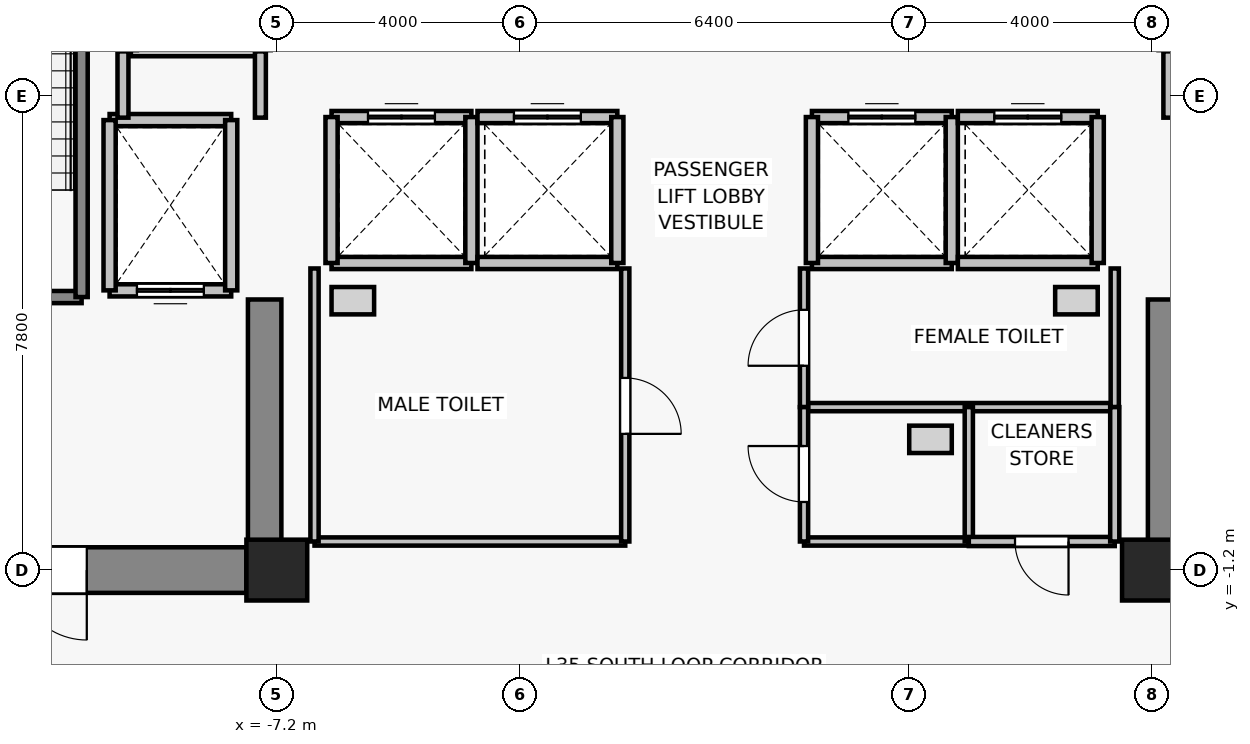
"""IFC4 building model, lengths in metres.
Left out: names, types, materials, properties, quantities, classifications, styles, units other than length and angle.
Written with IfcOpenShell. Run it as: python <this file> out.ifc"""

import sys

from ifc_helpers import new_model, si_unit, direction, frame, frame_2d, origin, origin_2d, place, context, subcontext, project, spatial, rectangle, extrude, source, transform, mapped, element, fill, save


model = new_model("IFC4")
c1 = context("Model", 3, precision=1e-05, world=origin(), true_north=direction((0.0, 1.0)))
c2 = subcontext(c1, "Body", "Model", "MODEL_VIEW")
j1 = project(units=[si_unit("LENGTHUNIT", "METRE"), si_unit("PLANEANGLEUNIT", "RADIAN")], contexts=[c1])
p1 = place(None, origin())
s1 = spatial("IfcSite", under=j1, at=p1, CompositionType="ELEMENT")
p2 = place(p1, origin())
s2 = spatial("IfcBuilding", under=s1, at=p2, CompositionType="ELEMENT")
p3 = place(p2, frame((0.0, 0.0, 126.4)))
s3 = spatial("IfcBuildingStorey", under=s2, at=p3, CompositionType="ELEMENT", Elevation=126.4)
for number, where, z_axis, x_axis in (
    (1, (-7.2, -1.2, 0.0), (0.0, 0.0, 1.0), (1.0, 0.0, 0.0)),
    (2, (7.2, -1.2, 0.0), (0.0, 0.0, 1.0), (1.0, 0.0, 0.0)),
):
    element("IfcColumn", number, at=place(p3, frame(where, z_axis=z_axis, x_axis=x_axis)), inside=s3, PredefinedType="COLUMN", context=c2, shape_type="SweptSolid", body=[
        extrude(rectangle(XDim=1.0, YDim=1.0, at=origin_2d()), origin(), (0.0, 0.0, 1.0), 3.3),
    ])
p4 = place(p3, frame((-7.7, -1.2, 0.0), z_axis=(0.0, 0.0, 1.0), x_axis=(-1.0, 0.0, 0.0)))
e3 = element("IfcWall", 3, at=p4, inside=s3, PredefinedType="SHEAR", context=c2, shape_type="SweptSolid", body=[
    extrude(rectangle(XDim=6.2, YDim=0.75, at=frame_2d((3.1, 0.0))), origin(), (0.0, 0.0, 1.0), 3.075),
])
p5 = place(p4, frame((2.625, 0.0, 0.0)))
e4 = element("IfcOpeningElement", 4, at=p5, cuts=e3, PredefinedType="OPENING", context=c2, shape_type="SweptSolid", body=[
    extrude(rectangle(XDim=1.15, YDim=2.15, at=frame_2d((0.575, 1.075))), frame((0.0, 0.385, 0.0), z_axis=(0.0, -1.0, 0.0), x_axis=(1.0, 0.0, 0.0)), (0.0, 0.0, 1.0), 0.77),
])
for number, where, z_axis, x_axis in (
    (5, (-7.4, -0.825, 0.0), (0.0, 0.0, 1.0), (0.0, 1.0, 0.0)),
    (6, (7.4, -0.825, 0.0), (0.0, 0.0, 1.0), (0.0, 1.0, 0.0)),
):
    element("IfcWall", number, at=place(p3, frame(where, z_axis=z_axis, x_axis=x_axis)), inside=s3, PredefinedType="SHEAR", context=c2, shape_type="SweptSolid", body=[
        extrude(rectangle(XDim=4.075, YDim=0.55, at=frame_2d((2.038, 0.0))), origin(), (0.0, 0.0, 1.0), 3.075),
    ])
p6 = place(p3, frame((-7.95, 3.4, 0.0), z_axis=(0.0, 0.0, 1.0), x_axis=(-1.0, 0.0, 0.0)))
e7 = element("IfcWall", 7, at=p6, inside=s3, PredefinedType="SOLIDWALL", context=c2, shape_type="SweptSolid", body=[
    extrude(rectangle(XDim=2.0, YDim=0.2, at=frame_2d((1.0, 0.0))), origin(), (0.0, 0.0, 1.0), 3.075),
])
p7 = place(p6, frame((0.45, 0.0, 0.0)))
e8 = element("IfcOpeningElement", 8, at=p7, cuts=e7, PredefinedType="OPENING", context=c2, shape_type="SweptSolid", body=[
    extrude(rectangle(XDim=1.1, YDim=2.2, at=frame_2d((0.55, 1.1))), frame((0.0, 0.11, 0.0), z_axis=(0.0, -1.0, 0.0), x_axis=(1.0, 0.0, 0.0)), (0.0, 0.0, 1.0), 0.22),
])
p8 = place(p3, frame((-9.95, 6.2, 0.0), z_axis=(0.0, 0.0, 1.0), x_axis=(1.0, 0.0, 0.0)))
e9 = element("IfcWall", 9, at=p8, inside=s3, PredefinedType="SOLIDWALL", context=c2, shape_type="SweptSolid", body=[
    extrude(rectangle(XDim=2.0, YDim=0.2, at=frame_2d((1.0, 0.0))), origin(), (0.0, 0.0, 1.0), 3.075),
])
for number, where, z_axis, x_axis in (
    (10, (-9.95, 3.4, 0.0), (0.0, 0.0, 1.0), (0.0, 1.0, 0.0)),
    (11, (-7.95, 6.2, 0.0), (0.0, 0.0, 1.0), (0.0, -1.0, 0.0)),
):
    element("IfcWall", number, at=place(p3, frame(where, z_axis=z_axis, x_axis=x_axis)), inside=s3, PredefinedType="SOLIDWALL", context=c2, shape_type="SweptSolid", body=[
        extrude(rectangle(XDim=2.8, YDim=0.2, at=frame_2d((1.4, 0.0))), origin(), (0.0, 0.0, 1.0), 3.075),
    ])
p9 = place(p3, frame((-4.0, 3.85, 0.0), z_axis=(0.0, 0.0, 1.0), x_axis=(-1.0, 0.0, 0.0)))
e12 = element("IfcWall", 12, at=p9, inside=s3, PredefinedType="SOLIDWALL", context=c2, shape_type="SweptSolid", body=[
    extrude(rectangle(XDim=2.3, YDim=0.2, at=frame_2d((1.15, 0.0))), origin(), (0.0, 0.0, 1.0), 3.075),
])
p10 = place(p3, frame((-6.3, 6.25, 0.0), z_axis=(0.0, 0.0, 1.0), x_axis=(1.0, 0.0, 0.0)))
e13 = element("IfcWall", 13, at=p10, inside=s3, PredefinedType="SOLIDWALL", context=c2, shape_type="SweptSolid", body=[
    extrude(rectangle(XDim=2.3, YDim=0.2, at=frame_2d((1.15, 0.0))), origin(), (0.0, 0.0, 1.0), 3.075),
])
p11 = place(p10, frame((0.6, 0.0, 0.0)))
e14 = element("IfcOpeningElement", 14, at=p11, cuts=e13, PredefinedType="OPENING", context=c2, shape_type="SweptSolid", body=[
    extrude(rectangle(XDim=1.1, YDim=2.2, at=frame_2d((0.55, 1.1))), frame((0.0, 0.11, 0.0), z_axis=(0.0, -1.0, 0.0), x_axis=(1.0, 0.0, 0.0)), (0.0, 0.0, 1.0), 0.22),
])
for number, where, z_axis, x_axis in (
    (15, (-6.3, 3.85, 0.0), (0.0, 0.0, 1.0), (0.0, 1.0, 0.0)),
    (16, (-4.0, 6.25, 0.0), (0.0, 0.0, 1.0), (0.0, -1.0, 0.0)),
):
    element("IfcWall", number, at=place(p3, frame(where, z_axis=z_axis, x_axis=x_axis)), inside=s3, PredefinedType="SOLIDWALL", context=c2, shape_type="SweptSolid", body=[
        extrude(rectangle(XDim=2.4, YDim=0.2, at=frame_2d((1.2, 0.0))), origin(), (0.0, 0.0, 1.0), 3.075),
    ])
p12 = place(p3, frame((-1.6, 3.85, 0.0), z_axis=(0.0, 0.0, 1.0), x_axis=(-1.0, 0.0, 0.0)))
e17 = element("IfcWall", 17, at=p12, inside=s3, PredefinedType="SOLIDWALL", context=c2, shape_type="SweptSolid", body=[
    extrude(rectangle(XDim=2.3, YDim=0.2, at=frame_2d((1.15, 0.0))), origin(), (0.0, 0.0, 1.0), 3.075),
])
p13 = place(p3, frame((-3.9, 6.25, 0.0), z_axis=(0.0, 0.0, 1.0), x_axis=(1.0, 0.0, 0.0)))
e18 = element("IfcWall", 18, at=p13, inside=s3, PredefinedType="SOLIDWALL", context=c2, shape_type="SweptSolid", body=[
    extrude(rectangle(XDim=2.3, YDim=0.2, at=frame_2d((1.15, 0.0))), origin(), (0.0, 0.0, 1.0), 3.075),
])
p14 = place(p13, frame((0.6, 0.0, 0.0)))
e19 = element("IfcOpeningElement", 19, at=p14, cuts=e18, PredefinedType="OPENING", context=c2, shape_type="SweptSolid", body=[
    extrude(rectangle(XDim=1.1, YDim=2.2, at=frame_2d((0.55, 1.1))), frame((0.0, 0.11, 0.0), z_axis=(0.0, -1.0, 0.0), x_axis=(1.0, 0.0, 0.0)), (0.0, 0.0, 1.0), 0.22),
])
p15 = place(p3, frame((-1.6, 6.25, 0.0), z_axis=(0.0, 0.0, 1.0), x_axis=(0.0, -1.0, 0.0)))
e20 = element("IfcWall", 20, at=p15, inside=s3, PredefinedType="SOLIDWALL", context=c2, shape_type="SweptSolid", body=[
    extrude(rectangle(XDim=2.4, YDim=0.2, at=frame_2d((1.2, 0.0))), origin(), (0.0, 0.0, 1.0), 3.075),
])
p16 = place(p3, frame((3.9, 3.85, 0.0), z_axis=(0.0, 0.0, 1.0), x_axis=(-1.0, 0.0, 0.0)))
e21 = element("IfcWall", 21, at=p16, inside=s3, PredefinedType="SOLIDWALL", context=c2, shape_type="SweptSolid", body=[
    extrude(rectangle(XDim=2.3, YDim=0.2, at=frame_2d((1.15, 0.0))), origin(), (0.0, 0.0, 1.0), 3.075),
])
p17 = place(p3, frame((1.6, 6.25, 0.0), z_axis=(0.0, 0.0, 1.0), x_axis=(1.0, 0.0, 0.0)))
e22 = element("IfcWall", 22, at=p17, inside=s3, PredefinedType="SOLIDWALL", context=c2, shape_type="SweptSolid", body=[
    extrude(rectangle(XDim=2.3, YDim=0.2, at=frame_2d((1.15, 0.0))), origin(), (0.0, 0.0, 1.0), 3.075),
])
p18 = place(p17, frame((0.6, 0.0, 0.0)))
e23 = element("IfcOpeningElement", 23, at=p18, cuts=e22, PredefinedType="OPENING", context=c2, shape_type="SweptSolid", body=[
    extrude(rectangle(XDim=1.1, YDim=2.2, at=frame_2d((0.55, 1.1))), frame((0.0, 0.11, 0.0), z_axis=(0.0, -1.0, 0.0), x_axis=(1.0, 0.0, 0.0)), (0.0, 0.0, 1.0), 0.22),
])
for number, where, z_axis, x_axis in (
    (24, (1.6, 3.85, 0.0), (0.0, 0.0, 1.0), (0.0, 1.0, 0.0)),
    (25, (3.9, 6.25, 0.0), (0.0, 0.0, 1.0), (0.0, -1.0, 0.0)),
):
    element("IfcWall", number, at=place(p3, frame(where, z_axis=z_axis, x_axis=x_axis)), inside=s3, PredefinedType="SOLIDWALL", context=c2, shape_type="SweptSolid", body=[
        extrude(rectangle(XDim=2.4, YDim=0.2, at=frame_2d((1.2, 0.0))), origin(), (0.0, 0.0, 1.0), 3.075),
    ])
p19 = place(p3, frame((6.3, 3.85, 0.0), z_axis=(0.0, 0.0, 1.0), x_axis=(-1.0, 0.0, 0.0)))
e26 = element("IfcWall", 26, at=p19, inside=s3, PredefinedType="SOLIDWALL", context=c2, shape_type="SweptSolid", body=[
    extrude(rectangle(XDim=2.3, YDim=0.2, at=frame_2d((1.15, 0.0))), origin(), (0.0, 0.0, 1.0), 3.075),
])
p20 = place(p3, frame((4.0, 6.25, 0.0), z_axis=(0.0, 0.0, 1.0), x_axis=(1.0, 0.0, 0.0)))
e27 = element("IfcWall", 27, at=p20, inside=s3, PredefinedType="SOLIDWALL", context=c2, shape_type="SweptSolid", body=[
    extrude(rectangle(XDim=2.3, YDim=0.2, at=frame_2d((1.15, 0.0))), origin(), (0.0, 0.0, 1.0), 3.075),
])
p21 = place(p20, frame((0.6, 0.0, 0.0)))
e28 = element("IfcOpeningElement", 28, at=p21, cuts=e27, PredefinedType="OPENING", context=c2, shape_type="SweptSolid", body=[
    extrude(rectangle(XDim=1.1, YDim=2.2, at=frame_2d((0.55, 1.1))), frame((0.0, 0.11, 0.0), z_axis=(0.0, -1.0, 0.0), x_axis=(1.0, 0.0, 0.0)), (0.0, 0.0, 1.0), 0.22),
])
p22 = place(p3, frame((6.3, 6.25, 0.0), z_axis=(0.0, 0.0, 1.0), x_axis=(0.0, -1.0, 0.0)))
e29 = element("IfcWall", 29, at=p22, inside=s3, PredefinedType="SOLIDWALL", context=c2, shape_type="SweptSolid", body=[
    extrude(rectangle(XDim=2.4, YDim=0.2, at=frame_2d((1.2, 0.0))), origin(), (0.0, 0.0, 1.0), 3.075),
])
for number, where, z_axis, x_axis in (
    (30, (-7.4, 7.35, 0.0), (0.0, 0.0, 1.0), (-1.0, 0.0, 0.0)),
    (31, (9.6, 7.35, 0.0), (0.0, 0.0, 1.0), (-1.0, 0.0, 0.0)),
):
    element("IfcWall", number, at=place(p3, frame(where, z_axis=z_axis, x_axis=x_axis)), inside=s3, PredefinedType="SOLIDWALL", context=c2, shape_type="SweptSolid", body=[
        extrude(rectangle(XDim=2.2, YDim=0.2, at=frame_2d((1.1, 0.0))), origin(), (0.0, 0.0, 1.0), 2.515),
    ])
p23 = place(p3, frame((-10.41, 3.29, 0.0), z_axis=(0.0, 0.0, 1.0), x_axis=(-1.0, 0.0, 0.0)))
e32 = element("IfcWall", 32, at=p23, inside=s3, PredefinedType="SOLIDWALL", context=c2, shape_type="SweptSolid", body=[
    extrude(rectangle(XDim=3.52, YDim=0.2, at=frame_2d((1.76, 0.0))), origin(), (0.0, 0.0, 1.0), 3.075),
])
p24 = place(p23, frame((1.165, 0.0, 0.0)))
e33 = element("IfcOpeningElement", 33, at=p24, cuts=e32, PredefinedType="OPENING", context=c2, shape_type="SweptSolid", body=[
    extrude(rectangle(XDim=1.15, YDim=2.15, at=frame_2d((0.575, 1.075))), frame((0.0, 0.11, 0.0), z_axis=(0.0, -1.0, 0.0), x_axis=(1.0, 0.0, 0.0)), (0.0, 0.0, 1.0), 0.22),
])
p25 = place(p3, frame((-10.41, 12.13, 0.0), z_axis=(0.0, 0.0, 1.0), x_axis=(0.0, -1.0, 0.0)))
e34 = element("IfcWall", 34, at=p25, inside=s3, PredefinedType="SOLIDWALL", context=c2, shape_type="SweptSolid", body=[
    extrude(rectangle(XDim=8.84, YDim=0.2, at=frame_2d((4.42, 0.0))), origin(), (0.0, 0.0, 1.0), 3.075),
])
p26 = place(p3, frame((-9.73, 6.24, 0.0), z_axis=(0.0, 0.0, 1.0), x_axis=(0.0, 1.0, 0.0)))
e35 = element("IfcWall", 35, at=p26, inside=s3, PredefinedType="PARTITIONING", context=c2, shape_type="SweptSolid", body=[
    extrude(rectangle(XDim=1.09, YDim=0.18, at=frame_2d((0.545, 0.0))), origin(), (0.0, 0.0, 1.0), 3.075),
])
for number, where, z_axis, x_axis in (
    (36, (-7.47, 7.33, 0.0), (0.0, 0.0, 1.0), (0.0, -1.0, 0.0)),
    (37, (7.47, 6.24, 0.0), (0.0, 0.0, 1.0), (0.0, 1.0, 0.0)),
):
    element("IfcWall", number, at=place(p3, frame(where, z_axis=z_axis, x_axis=x_axis)), inside=s3, PredefinedType="PARTITIONING", context=c2, shape_type="SweptSolid", body=[
        extrude(rectangle(XDim=1.09, YDim=0.18, at=frame_2d((0.545, 0.0))), origin(), (0.0, 0.0, 1.0), 2.515),
    ])
p27 = place(p3, frame((-1.47, -0.73, 0.0), z_axis=(0.0, 0.0, 1.0), x_axis=(-1.0, 0.0, 0.0)))
e38 = element("IfcWall", 38, at=p27, inside=s3, PredefinedType="PARTITIONING", context=c2, shape_type="SweptSolid", body=[
    extrude(rectangle(XDim=5.11, YDim=0.135, at=frame_2d((2.555, 0.0))), origin(), (0.0, 0.0, 1.0), 3.075),
])
p28 = place(p3, frame((-6.58, -0.73, 0.0), z_axis=(0.0, 0.0, 1.0), x_axis=(0.0, 1.0, 0.0)))
e39 = element("IfcWall", 39, at=p28, inside=s3, PredefinedType="PARTITIONING", context=c2, shape_type="SweptSolid", body=[
    extrude(rectangle(XDim=4.49, YDim=0.135, at=frame_2d((2.245, 0.0))), origin(), (0.0, 0.0, 1.0), 3.075),
])
p29 = place(p3, frame((-1.47, 3.76, 0.0), z_axis=(0.0, 0.0, 1.0), x_axis=(0.0, -1.0, 0.0)))
e40 = element("IfcWall", 40, at=p29, inside=s3, PredefinedType="PARTITIONING", context=c2, shape_type="SweptSolid", body=[
    extrude(rectangle(XDim=4.49, YDim=0.135, at=frame_2d((2.245, 0.0))), origin(), (0.0, 0.0, 1.0), 3.075),
])
p30 = place(p29, frame((1.8, 0.0, 0.0)))
e41 = element("IfcOpeningElement", 41, at=p30, cuts=e40, PredefinedType="OPENING", context=c2, shape_type="SweptSolid", body=[
    extrude(rectangle(XDim=0.92, YDim=2.1, at=frame_2d((0.46, 1.05))), frame((0.0, 0.077, 0.0), z_axis=(0.0, -1.0, 0.0), x_axis=(1.0, 0.0, 0.0)), (0.0, 0.0, 1.0), 0.155),
])
p31 = place(p3, frame((6.58, 1.48, 0.0), z_axis=(0.0, 0.0, 1.0), x_axis=(-1.0, 0.0, 0.0)))
e42 = element("IfcWall", 42, at=p31, inside=s3, PredefinedType="PARTITIONING", context=c2, shape_type="SweptSolid", body=[
    extrude(rectangle(XDim=5.11, YDim=0.135, at=frame_2d((2.555, 0.0))), origin(), (0.0, 0.0, 1.0), 3.075),
])
p32 = place(p3, frame((1.47, 1.48, 0.0), z_axis=(0.0, 0.0, 1.0), x_axis=(0.0, 1.0, 0.0)))
e43 = element("IfcWall", 43, at=p32, inside=s3, PredefinedType="PARTITIONING", context=c2, shape_type="SweptSolid", body=[
    extrude(rectangle(XDim=2.28, YDim=0.135, at=frame_2d((1.14, 0.0))), origin(), (0.0, 0.0, 1.0), 3.075),
])
p33 = place(p32, frame((0.68, 0.0, 0.0)))
e44 = element("IfcOpeningElement", 44, at=p33, cuts=e43, PredefinedType="OPENING", context=c2, shape_type="SweptSolid", body=[
    extrude(rectangle(XDim=0.92, YDim=2.1, at=frame_2d((0.46, 1.05))), frame((0.0, 0.077, 0.0), z_axis=(0.0, -1.0, 0.0), x_axis=(1.0, 0.0, 0.0)), (0.0, 0.0, 1.0), 0.155),
])
p34 = place(p3, frame((6.58, 3.76, 0.0), z_axis=(0.0, 0.0, 1.0), x_axis=(0.0, -1.0, 0.0)))
e45 = element("IfcWall", 45, at=p34, inside=s3, PredefinedType="PARTITIONING", context=c2, shape_type="SweptSolid", body=[
    extrude(rectangle(XDim=2.28, YDim=0.135, at=frame_2d((1.14, 0.0))), origin(), (0.0, 0.0, 1.0), 3.075),
])
p35 = place(p3, frame((4.18, -0.73, 0.0), z_axis=(0.0, 0.0, 1.0), x_axis=(-1.0, 0.0, 0.0)))
e46 = element("IfcWall", 46, at=p35, inside=s3, PredefinedType="PARTITIONING", context=c2, shape_type="SweptSolid", body=[
    extrude(rectangle(XDim=2.71, YDim=0.135, at=frame_2d((1.355, 0.0))), origin(), (0.0, 0.0, 1.0), 3.075),
])
p36 = place(p3, frame((1.47, -0.73, 0.0), z_axis=(0.0, 0.0, 1.0), x_axis=(0.0, 1.0, 0.0)))
e47 = element("IfcWall", 47, at=p36, inside=s3, PredefinedType="PARTITIONING", context=c2, shape_type="SweptSolid", body=[
    extrude(rectangle(XDim=2.21, YDim=0.135, at=frame_2d((1.105, 0.0))), origin(), (0.0, 0.0, 1.0), 3.075),
])
p37 = place(p36, frame((0.65, 0.0, 0.0)))
e48 = element("IfcOpeningElement", 48, at=p37, cuts=e47, PredefinedType="OPENING", context=c2, shape_type="SweptSolid", body=[
    extrude(rectangle(XDim=0.92, YDim=2.1, at=frame_2d((0.46, 1.05))), frame((0.0, 0.077, 0.0), z_axis=(0.0, -1.0, 0.0), x_axis=(1.0, 0.0, 0.0)), (0.0, 0.0, 1.0), 0.155),
])
p38 = place(p3, frame((4.18, 1.48, 0.0), z_axis=(0.0, 0.0, 1.0), x_axis=(0.0, -1.0, 0.0)))
e49 = element("IfcWall", 49, at=p38, inside=s3, PredefinedType="PARTITIONING", context=c2, shape_type="SweptSolid", body=[
    extrude(rectangle(XDim=2.21, YDim=0.135, at=frame_2d((1.105, 0.0))), origin(), (0.0, 0.0, 1.0), 3.075),
])
p39 = place(p3, frame((6.58, -0.73, 0.0), z_axis=(0.0, 0.0, 1.0), x_axis=(-1.0, 0.0, 0.0)))
e50 = element("IfcWall", 50, at=p39, inside=s3, PredefinedType="PARTITIONING", context=c2, shape_type="SweptSolid", body=[
    extrude(rectangle(XDim=2.4, YDim=0.15, at=frame_2d((1.2, 0.0))), origin(), (0.0, 0.0, 1.0), 3.075),
])
p40 = place(p39, frame((0.76, 0.0, 0.0)))
e51 = element("IfcOpeningElement", 51, at=p40, cuts=e50, PredefinedType="OPENING", context=c2, shape_type="SweptSolid", body=[
    extrude(rectangle(XDim=0.88, YDim=2.1, at=frame_2d((0.44, 1.05))), frame((0.0, 0.085, 0.0), z_axis=(0.0, -1.0, 0.0), x_axis=(1.0, 0.0, 0.0)), (0.0, 0.0, 1.0), 0.17),
])
p41 = place(p3, frame((6.58, 1.48, 0.0), z_axis=(0.0, 0.0, 1.0), x_axis=(0.0, -1.0, 0.0)))
e52 = element("IfcWall", 52, at=p41, inside=s3, PredefinedType="PARTITIONING", context=c2, shape_type="SweptSolid", body=[
    extrude(rectangle(XDim=2.21, YDim=0.15, at=frame_2d((1.105, 0.0))), origin(), (0.0, 0.0, 1.0), 3.075),
])
m1 = source(origin(), c2, "Body", "SweptSolid", [
    extrude(rectangle(XDim=1.1, YDim=2.2, at=frame_2d((0.55, 1.1))), frame((0.0, 0.025, 0.0), z_axis=(0.0, -1.0, 0.0), x_axis=(1.0, 0.0, 0.0)), (0.0, 0.0, 1.0), 0.05),
])
p42 = place(p7, origin())
e53 = element("IfcDoor", 53, at=p42, inside=s3, OperationType="DOUBLE_DOOR_SLIDING", PredefinedType="DOOR", context=c2, shape_type="MappedRepresentation", body=[
    mapped(m1, transform((0.0, 0.0, 0.0), x_axis=(1.0, 0.0, 0.0), y_axis=(0.0, 1.0, 0.0), z_axis=(0.0, 0.0, 1.0), scale=1.0)),
])
fill(e8, e53)
p43 = place(p11, origin())
e54 = element("IfcDoor", 54, at=p43, inside=s3, OperationType="DOUBLE_DOOR_SLIDING", PredefinedType="DOOR", context=c2, shape_type="MappedRepresentation", body=[
    mapped(m1, transform((0.0, 0.0, 0.0), x_axis=(1.0, 0.0, 0.0), y_axis=(0.0, 1.0, 0.0), z_axis=(0.0, 0.0, 1.0), scale=1.0)),
])
fill(e14, e54)
p44 = place(p14, origin())
e55 = element("IfcDoor", 55, at=p44, inside=s3, OperationType="DOUBLE_DOOR_SLIDING", PredefinedType="DOOR", context=c2, shape_type="MappedRepresentation", body=[
    mapped(m1, transform((0.0, 0.0, 0.0), x_axis=(1.0, 0.0, 0.0), y_axis=(0.0, 1.0, 0.0), z_axis=(0.0, 0.0, 1.0), scale=1.0)),
])
fill(e19, e55)
p45 = place(p18, origin())
e56 = element("IfcDoor", 56, at=p45, inside=s3, OperationType="DOUBLE_DOOR_SLIDING", PredefinedType="DOOR", context=c2, shape_type="MappedRepresentation", body=[
    mapped(m1, transform((0.0, 0.0, 0.0), x_axis=(1.0, 0.0, 0.0), y_axis=(0.0, 1.0, 0.0), z_axis=(0.0, 0.0, 1.0), scale=1.0)),
])
fill(e23, e56)
p46 = place(p21, origin())
e57 = element("IfcDoor", 57, at=p46, inside=s3, OperationType="DOUBLE_DOOR_SLIDING", PredefinedType="DOOR", context=c2, shape_type="MappedRepresentation", body=[
    mapped(m1, transform((0.0, 0.0, 0.0), x_axis=(1.0, 0.0, 0.0), y_axis=(0.0, 1.0, 0.0), z_axis=(0.0, 0.0, 1.0), scale=1.0)),
])
fill(e28, e57)
m2 = source(origin(), c2, "Body", "SweptSolid", [
    extrude(rectangle(XDim=1.15, YDim=2.15, at=frame_2d((0.575, 1.075))), frame((0.0, 0.025, 0.0), z_axis=(0.0, -1.0, 0.0), x_axis=(1.0, 0.0, 0.0)), (0.0, 0.0, 1.0), 0.05),
])
p47 = place(p5, origin())
e58 = element("IfcDoor", 58, at=p47, inside=s3, OperationType="SINGLE_SWING_LEFT", PredefinedType="DOOR", context=c2, shape_type="MappedRepresentation", body=[
    mapped(m2, transform((0.0, 0.0, 0.0), x_axis=(1.0, 0.0, 0.0), y_axis=(0.0, 1.0, 0.0), z_axis=(0.0, 0.0, 1.0), scale=1.0)),
])
fill(e4, e58)
m3 = source(origin(), c2, "Body", "SweptSolid", [
    extrude(rectangle(XDim=0.92, YDim=2.1, at=frame_2d((0.46, 1.05))), frame((0.0, 0.025, 0.0), z_axis=(0.0, -1.0, 0.0), x_axis=(1.0, 0.0, 0.0)), (0.0, 0.0, 1.0), 0.05),
])
p48 = place(p30, origin())
e59 = element("IfcDoor", 59, at=p48, inside=s3, OperationType="SINGLE_SWING_RIGHT", PredefinedType="DOOR", context=c2, shape_type="MappedRepresentation", body=[
    mapped(m3, transform((0.0, 0.0, 0.0), x_axis=(1.0, 0.0, 0.0), y_axis=(0.0, 1.0, 0.0), z_axis=(0.0, 0.0, 1.0), scale=1.0)),
])
fill(e41, e59)
p49 = place(p33, origin())
e60 = element("IfcDoor", 60, at=p49, inside=s3, OperationType="SINGLE_SWING_LEFT", PredefinedType="DOOR", context=c2, shape_type="MappedRepresentation", body=[
    mapped(m3, transform((0.0, 0.0, 0.0), x_axis=(1.0, 0.0, 0.0), y_axis=(0.0, 1.0, 0.0), z_axis=(0.0, 0.0, 1.0), scale=1.0)),
])
fill(e44, e60)
p50 = place(p37, origin())
e61 = element("IfcDoor", 61, at=p50, inside=s3, OperationType="SINGLE_SWING_RIGHT", PredefinedType="DOOR", context=c2, shape_type="MappedRepresentation", body=[
    mapped(m3, transform((0.0, 0.0, 0.0), x_axis=(1.0, 0.0, 0.0), y_axis=(0.0, 1.0, 0.0), z_axis=(0.0, 0.0, 1.0), scale=1.0)),
])
fill(e48, e61)
m4 = source(origin(), c2, "Body", "SweptSolid", [
    extrude(rectangle(XDim=0.88, YDim=2.1, at=frame_2d((0.44, 1.05))), frame((0.0, 0.025, 0.0), z_axis=(0.0, -1.0, 0.0), x_axis=(1.0, 0.0, 0.0)), (0.0, 0.0, 1.0), 0.05),
])
p51 = place(p40, origin())
e62 = element("IfcDoor", 62, at=p51, inside=s3, OperationType="SINGLE_SWING_LEFT", PredefinedType="DOOR", context=c2, shape_type="MappedRepresentation", body=[
    mapped(m4, transform((0.0, 0.0, 0.0), x_axis=(1.0, 0.0, 0.0), y_axis=(0.0, 1.0, 0.0), z_axis=(0.0, 0.0, 1.0), scale=1.0)),
])
fill(e51, e62)
save(model, sys.argv[1])
